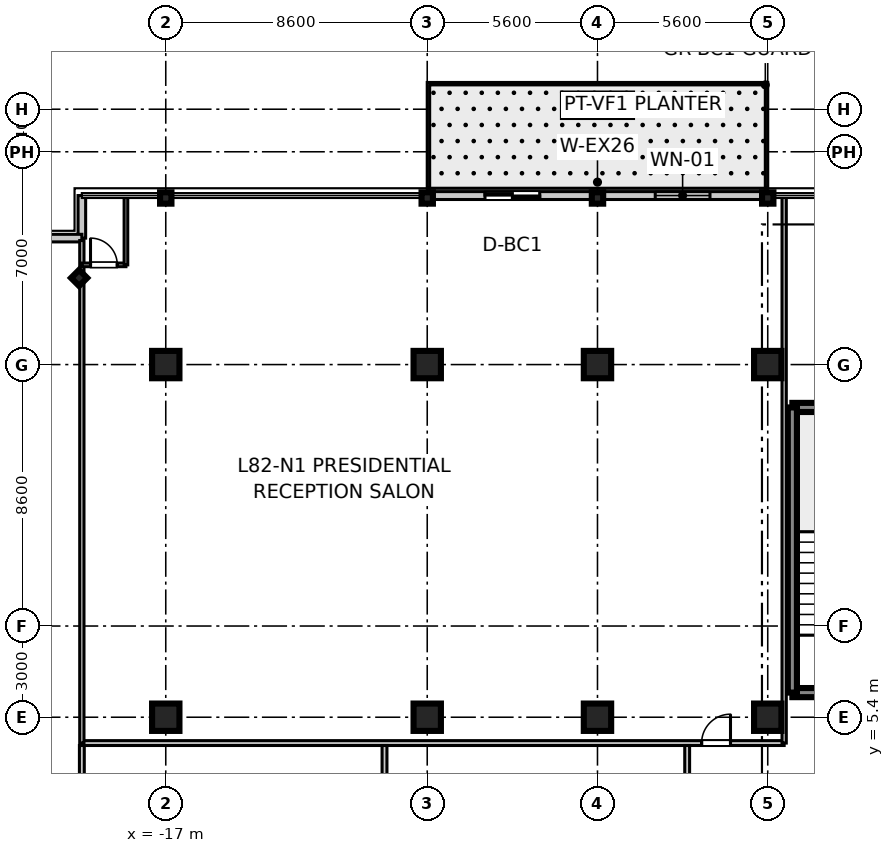
"""IFC4 building model, lengths in metres.
Left out: names, types, materials, properties, quantities, classifications, styles, units other than length and angle.
Written with IfcOpenShell. Run it as: python <this file> out.ifc"""

import sys

from ifc_helpers import new_model, si_unit, direction, frame, frame_2d, origin, origin_2d, place, context, subcontext, project, spatial, rectangle, i_section, extrude, source, transform, mapped, element, fill, save


model = new_model("IFC4")
c1 = context("Model", 3, precision=1e-05, world=origin(), true_north=direction((0.0, 1.0)))
c2 = subcontext(c1, "Body", "Model", "MODEL_VIEW")
j1 = project(units=[si_unit("LENGTHUNIT", "METRE"), si_unit("PLANEANGLEUNIT", "RADIAN")], contexts=[c1])
p1 = place(None, origin())
s1 = spatial("IfcSite", under=j1, at=p1, CompositionType="ELEMENT")
p2 = place(p1, origin())
s2 = spatial("IfcBuilding", under=s1, at=p2, CompositionType="ELEMENT")
p3 = place(p2, frame((0.0, 0.0, 319.55)))
s3 = spatial("IfcBuildingStorey", under=s2, at=p3, CompositionType="ELEMENT", Elevation=319.55)
m1 = source(origin(), c2, "Body", "SweptSolid", [
    extrude(rectangle(XDim=0.9, YDim=0.9, at=origin_2d()), origin(), (0.0, 0.0, 1.0), 3.755),
])
for number, where, z_axis, x_axis in (
    (1, (-17.0, 5.4, 0.0), (0.0, 0.0, 1.0), (1.0, 0.0, 0.0)),
    (2, (-17.0, 17.0, 0.0), (0.0, 0.0, 1.0), (1.0, 0.0, 0.0)),
    (3, (-8.4, 5.4, 0.0), (0.0, 0.0, 1.0), (1.0, 0.0, 0.0)),
    (4, (-8.4, 17.0, 0.0), (0.0, 0.0, 1.0), (1.0, 0.0, 0.0)),
    (5, (-2.8, 5.4, 0.0), (0.0, 0.0, 1.0), (1.0, 0.0, 0.0)),
    (6, (-2.8, 17.0, 0.0), (0.0, 0.0, 1.0), (1.0, 0.0, 0.0)),
    (7, (2.8, 5.4, 0.0), (0.0, 0.0, 1.0), (1.0, 0.0, 0.0)),
    (8, (2.8, 17.0, 0.0), (0.0, 0.0, 1.0), (1.0, 0.0, 0.0)),
):
    element("IfcColumn", number, at=place(p3, frame(where, z_axis=z_axis, x_axis=x_axis)), inside=s3, PredefinedType="COLUMN", context=c2, shape_type="MappedRepresentation", body=[
        mapped(m1, transform((0.0, 0.0, 0.0), scale=1.0)),
    ])
m2 = source(origin(), c2, "Body", "SweptSolid", [
    extrude(i_section(OverallWidth=0.374, OverallDepth=0.374, WebThickness=0.014, FlangeThickness=0.023, at=origin_2d()), origin(), (0.0, 0.0, 1.0), 3.755),
])
for number, where, z_axis, x_axis in (
    (9, (-17.0, 22.48, 0.0), (0.0, 0.0, 1.0), (0.0, 1.0, 0.0)),
    (10, (-8.4, 22.48, 0.0), (0.0, 0.0, 1.0), (0.0, 1.0, 0.0)),
    (11, (-2.8, 22.48, 0.0), (0.0, 0.0, 1.0), (0.0, 1.0, 0.0)),
    (12, (2.8, 22.48, 0.0), (0.0, 0.0, 1.0), (0.0, 1.0, 0.0)),
    (13, (-19.85, 19.85, 0.0), (0.0, 0.0, 1.0), (0.707, 0.707, 0.0)),
):
    element("IfcColumn", number, at=place(p3, frame(where, z_axis=z_axis, x_axis=x_axis)), inside=s3, PredefinedType="COLUMN", context=c2, shape_type="MappedRepresentation", body=[
        mapped(m2, transform((0.0, 0.0, 0.0), scale=1.0)),
    ])
m3 = source(origin(), c2, "Body", "SweptSolid", [
    extrude(rectangle(XDim=3.98, YDim=0.3, at=frame_2d((1.99, 0.0))), origin(), (0.0, 0.0, 1.0), 3.5),
])
for number, where, z_axis, x_axis in (
    (14, (3.61, 6.21, 0.0), (0.0, 0.0, 1.0), (1.0, 0.0, 0.0)),
    (15, (3.61, 15.59, 0.0), (0.0, 0.0, 1.0), (1.0, 0.0, 0.0)),
):
    element("IfcWall", number, at=place(p3, frame(where, z_axis=z_axis, x_axis=x_axis)), inside=s3, PredefinedType="SHEAR", context=c2, shape_type="MappedRepresentation", body=[
        mapped(m3, transform((0.0, 0.0, 0.0), scale=1.0)),
    ])
m4 = source(origin(), c2, "Body", "SweptSolid", [
    extrude(rectangle(XDim=9.38, YDim=0.3, at=frame_2d((4.69, 0.0))), origin(), (0.0, 0.0, 1.0), 3.5),
])
p4 = place(p3, frame((3.61, 6.21, 0.0), z_axis=(0.0, 0.0, 1.0), x_axis=(0.0, 1.0, 0.0)))
e16 = element("IfcWall", 16, at=p4, inside=s3, PredefinedType="SHEAR", context=c2, shape_type="MappedRepresentation", body=[
    mapped(m4, transform((0.0, 0.0, 0.0), scale=1.0)),
])
m5 = source(origin(), c2, "Body", "SweptSolid", [
    extrude(rectangle(XDim=1.4, YDim=0.25, at=frame_2d((0.7, 0.0))), origin(), (0.0, 0.0, 1.0), 3.5),
])
p5 = place(p3, frame((-19.76, 21.16, 0.0), z_axis=(0.0, 0.0, 1.0), x_axis=(0.0, 1.0, 0.0)))
e17 = element("IfcWall", 17, at=p5, inside=s3, PredefinedType="STANDARD", context=c2, shape_type="MappedRepresentation", body=[
    mapped(m5, transform((0.0, 0.0, 0.0), scale=1.0)),
])
m6 = source(origin(), c2, "Body", "SweptSolid", [
    extrude(rectangle(XDim=1.4, YDim=0.25, at=frame_2d((0.7, 0.0))), origin(), (0.0, 0.0, 1.0), 3.5),
])
p6 = place(p3, frame((-21.16, 21.16, 0.0), z_axis=(0.0, 0.0, 1.0), x_axis=(1.0, 0.0, 0.0)))
e18 = element("IfcWall", 18, at=p6, inside=s3, PredefinedType="STANDARD", context=c2, shape_type="MappedRepresentation", body=[
    mapped(m6, transform((0.0, 0.0, 0.0), scale=1.0)),
])
m7 = source(origin(), c2, "Body", "SweptSolid", [
    extrude(rectangle(XDim=11.2, YDim=0.26, at=frame_2d((5.6, 0.0))), origin(), (0.0, 0.0, 1.0), 2.98),
])
p7 = place(p3, frame((-8.4, 22.56, 0.0), z_axis=(0.0, 0.0, 1.0), x_axis=(1.0, 0.0, 0.0)))
e19 = element("IfcWall", 19, at=p7, inside=s3, PredefinedType="STANDARD", context=c2, shape_type="MappedRepresentation", body=[
    mapped(m7, transform((0.0, 0.0, 0.0), scale=1.0)),
])
p8 = place(p7, frame((1.9, 0.0, 0.0)))
e20 = element("IfcOpeningElement", 20, at=p8, cuts=e19, PredefinedType="OPENING", context=c2, shape_type="SweptSolid", body=[
    extrude(rectangle(XDim=1.8, YDim=2.25, at=frame_2d((0.9, 1.125))), frame((0.0, 0.14, 0.0), z_axis=(0.0, -1.0, 0.0), x_axis=(1.0, 0.0, 0.0)), (0.0, 0.0, 1.0), 0.28),
])
p9 = place(p7, frame((7.5, 0.0, 0.85)))
e21 = element("IfcOpeningElement", 21, at=p9, cuts=e19, PredefinedType="OPENING", context=c2, shape_type="SweptSolid", body=[
    extrude(rectangle(XDim=1.8, YDim=1.5, at=frame_2d((0.9, 0.75))), frame((0.0, 0.14, 0.0), z_axis=(0.0, -1.0, 0.0), x_axis=(1.0, 0.0, 0.0)), (0.0, 0.0, 1.0), 0.28),
])
m8 = source(origin(), c2, "Body", "SweptSolid", [
    extrude(rectangle(XDim=23.1, YDim=0.16, at=frame_2d((11.55, 0.0))), origin(), (0.0, 0.0, 1.0), 2.84),
])
p10 = place(p3, frame((-19.76, 4.55, 0.0), z_axis=(0.0, 0.0, 1.0), x_axis=(1.0, 0.0, 0.0)))
e22 = element("IfcWall", 22, at=p10, inside=s3, PredefinedType="PARTITIONING", context=c2, shape_type="MappedRepresentation", body=[
    mapped(m8, transform((0.0, 0.0, 0.0), scale=1.0)),
])
p11 = place(p10, frame((20.385, 0.0, 0.0)))
e23 = element("IfcOpeningElement", 23, at=p11, cuts=e22, PredefinedType="OPENING", context=c2, shape_type="SweptSolid", body=[
    extrude(rectangle(XDim=0.95, YDim=2.1, at=frame_2d((0.475, 1.05))), frame((0.0, 0.09, 0.0), z_axis=(0.0, -1.0, 0.0), x_axis=(1.0, 0.0, 0.0)), (0.0, 0.0, 1.0), 0.18),
])
m9 = source(origin(), c2, "Body", "SweptSolid", [
    extrude(rectangle(XDim=16.53, YDim=0.14, at=frame_2d((8.265, 0.0))), origin(), (0.0, 0.0, 1.0), 2.84),
])
p12 = place(p3, frame((-19.76, 4.55, 0.0), z_axis=(0.0, 0.0, 1.0), x_axis=(0.0, 1.0, 0.0)))
e24 = element("IfcWall", 24, at=p12, inside=s3, PredefinedType="PARTITIONING", context=c2, shape_type="MappedRepresentation", body=[
    mapped(m9, transform((0.0, 0.0, 0.0), scale=1.0)),
])
m10 = source(origin(), c2, "Body", "SweptSolid", [
    extrude(rectangle(XDim=17.95, YDim=0.14, at=frame_2d((8.975, 0.0))), origin(), (0.0, 0.0, 1.0), 2.84),
])
p13 = place(p3, frame((3.34, 4.55, 0.0), z_axis=(0.0, 0.0, 1.0), x_axis=(0.0, 1.0, 0.0)))
e25 = element("IfcWall", 25, at=p13, inside=s3, PredefinedType="PARTITIONING", context=c2, shape_type="MappedRepresentation", body=[
    mapped(m10, transform((0.0, 0.0, 0.0), scale=1.0)),
])
m11 = source(origin(), c2, "Body", "SweptSolid", [
    extrude(rectangle(XDim=1.45, YDim=0.12, at=frame_2d((0.725, 0.0))), origin(), (0.0, 0.0, 1.0), 2.84),
])
p14 = place(p3, frame((-19.76, 20.28, 0.0), z_axis=(0.0, 0.0, 1.0), x_axis=(1.0, 0.0, 0.0)))
e26 = element("IfcWall", 26, at=p14, inside=s3, PredefinedType="PARTITIONING", context=c2, shape_type="MappedRepresentation", body=[
    mapped(m11, transform((0.0, 0.0, 0.0), scale=1.0)),
])
p15 = place(p14, frame((0.285, 0.0, 0.0)))
e27 = element("IfcOpeningElement", 27, at=p15, cuts=e26, PredefinedType="OPENING", context=c2, shape_type="SweptSolid", body=[
    extrude(rectangle(XDim=0.88, YDim=2.1, at=frame_2d((0.44, 1.05))), frame((0.0, 0.07, 0.0), z_axis=(0.0, -1.0, 0.0), x_axis=(1.0, 0.0, 0.0)), (0.0, 0.0, 1.0), 0.14),
])
m12 = source(origin(), c2, "Body", "SweptSolid", [
    extrude(rectangle(XDim=2.22, YDim=0.12, at=frame_2d((1.11, 0.0))), origin(), (0.0, 0.0, 1.0), 2.84),
])
p16 = place(p3, frame((-18.31, 20.28, 0.0), z_axis=(0.0, 0.0, 1.0), x_axis=(0.0, 1.0, 0.0)))
e28 = element("IfcWall", 28, at=p16, inside=s3, PredefinedType="PARTITIONING", context=c2, shape_type="MappedRepresentation", body=[
    mapped(m12, transform((0.0, 0.0, 0.0), scale=1.0)),
])
m13 = source(origin(), c2, "Body", "SweptSolid", [
    extrude(rectangle(XDim=6.89, YDim=0.16, at=frame_2d((3.445, 0.0))), origin(), (0.0, 0.0, 1.0), 2.84),
])
for number, where, z_axis, x_axis in (
    (29, (-19.76, -2.42, 0.0), (0.0, 0.0, 1.0), (0.0, 1.0, 0.0)),
    (30, (-9.805, -2.42, 0.0), (0.0, 0.0, 1.0), (0.0, 1.0, 0.0)),
):
    element("IfcWall", number, at=place(p3, frame(where, z_axis=z_axis, x_axis=x_axis)), inside=s3, PredefinedType="PARTITIONING", context=c2, shape_type="MappedRepresentation", body=[
        mapped(m13, transform((0.0, 0.0, 0.0), scale=1.0)),
    ])
p17 = place(p3, frame((0.15, -2.42, 0.0), z_axis=(0.0, 0.0, 1.0), x_axis=(0.0, 1.0, 0.0)))
e31 = element("IfcWall", 31, at=p17, inside=s3, PredefinedType="PARTITIONING", context=c2, shape_type="MappedRepresentation", body=[
    mapped(m13, transform((0.0, 0.0, 0.0), scale=1.0)),
])
p18 = place(p17, frame((1.718, 0.0, 0.0)))
e32 = element("IfcOpeningElement", 32, at=p18, cuts=e31, PredefinedType="OPENING", context=c2, shape_type="SweptSolid", body=[
    extrude(rectangle(XDim=1.5, YDim=2.15, at=frame_2d((0.75, 1.075))), frame((0.0, 0.09, 0.0), z_axis=(0.0, -1.0, 0.0), x_axis=(1.0, 0.0, 0.0)), (0.0, 0.0, 1.0), 0.18),
])
m14 = source(origin(), c2, "Body", "SweptSolid", [
    extrude(rectangle(XDim=0.88, YDim=2.1, at=frame_2d((0.44, 1.05))), frame((0.0, 0.025, 0.0), z_axis=(0.0, -1.0, 0.0), x_axis=(1.0, 0.0, 0.0)), (0.0, 0.0, 1.0), 0.05),
])
p19 = place(p15, origin())
e33 = element("IfcDoor", 33, at=p19, inside=s3, OperationType="SINGLE_SWING_LEFT", PredefinedType="DOOR", context=c2, shape_type="MappedRepresentation", body=[
    mapped(m14, transform((0.0, 0.0, 0.0), scale=1.0)),
])
fill(e27, e33)
m15 = source(origin(), c2, "Body", "SweptSolid", [
    extrude(rectangle(XDim=0.95, YDim=2.1, at=frame_2d((0.475, 1.05))), frame((0.0, 0.025, 0.0), z_axis=(0.0, -1.0, 0.0), x_axis=(1.0, 0.0, 0.0)), (0.0, 0.0, 1.0), 0.05),
])
p20 = place(p11, origin())
e34 = element("IfcDoor", 34, at=p20, inside=s3, OperationType="SINGLE_SWING_RIGHT", PredefinedType="DOOR", context=c2, shape_type="MappedRepresentation", body=[
    mapped(m15, transform((0.0, 0.0, 0.0), scale=1.0)),
])
fill(e23, e34)
m16 = source(origin(), c2, "Body", "SweptSolid", [
    extrude(rectangle(XDim=1.8, YDim=2.25, at=frame_2d((0.9, 1.125))), frame((0.0, 0.025, 0.0), z_axis=(0.0, -1.0, 0.0), x_axis=(1.0, 0.0, 0.0)), (0.0, 0.0, 1.0), 0.05),
])
p21 = place(p8, origin())
e35 = element("IfcDoor", 35, at=p21, inside=s3, OperationType="DOUBLE_DOOR_SLIDING", PredefinedType="DOOR", context=c2, shape_type="MappedRepresentation", body=[
    mapped(m16, transform((0.0, 0.0, 0.0), scale=1.0)),
])
fill(e20, e35)
m17 = source(origin(), c2, "Body", "SweptSolid", [
    extrude(rectangle(XDim=1.8, YDim=1.5, at=frame_2d((0.9, 0.75))), frame((0.0, 0.03, 0.0), z_axis=(0.0, -1.0, 0.0), x_axis=(1.0, 0.0, 0.0)), (0.0, 0.0, 1.0), 0.06),
])
p22 = place(p9, origin())
e36 = element("IfcWindow", 36, at=p22, inside=s3, PartitioningType="SINGLE_PANEL", PredefinedType="WINDOW", context=c2, shape_type="MappedRepresentation", body=[
    mapped(m17, transform((0.0, 0.0, 0.0), scale=1.0)),
])
fill(e21, e36)
save(model, sys.argv[1])
